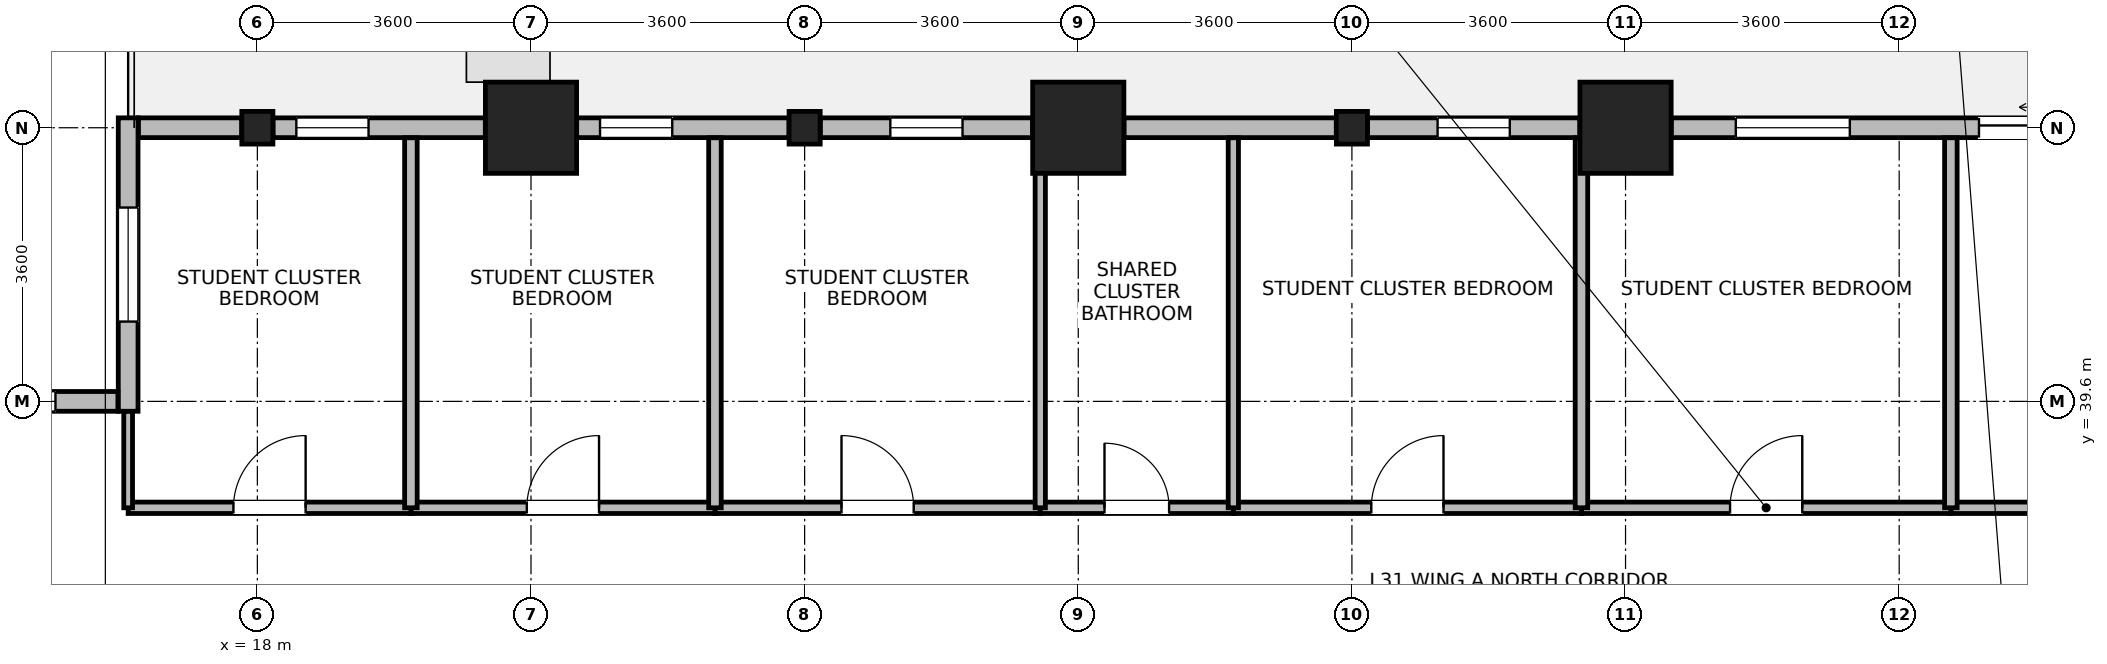
"""IFC4 building model, lengths in metres.
Left out: names, types, materials, properties, quantities, classifications, styles, units other than length and angle.
Written with IfcOpenShell. Run it as: python <this file> out.ifc"""

import sys

from ifc_helpers import new_model, si_unit, direction, frame, frame_2d, origin, origin_2d, place, context, subcontext, project, spatial, rectangle, i_section, extrude, source, transform, mapped, element, fill, save


model = new_model("IFC4")
c1 = context("Model", 3, precision=1e-05, world=origin(), true_north=direction((0.0, 1.0)))
c2 = subcontext(c1, "Body", "Model", "MODEL_VIEW")
j1 = project(units=[si_unit("LENGTHUNIT", "METRE"), si_unit("PLANEANGLEUNIT", "RADIAN")], contexts=[c1])
p1 = place(None, origin())
s1 = spatial("IfcSite", under=j1, at=p1, CompositionType="ELEMENT")
p2 = place(p1, origin())
s2 = spatial("IfcBuilding", under=s1, at=p2, CompositionType="ELEMENT")
p3 = place(p2, frame((0.0, 0.0, 123.0)))
s3 = spatial("IfcBuildingStorey", under=s2, at=p3, CompositionType="ELEMENT", Elevation=123.0)
m1 = source(origin(), c2, "Body", "SweptSolid", [
    extrude(rectangle(XDim=1.2, YDim=1.2, at=origin_2d()), origin(), (0.0, 0.0, 1.0), 3.7),
])
for number, where, z_axis, x_axis in (
    (1, (21.6, 43.2, 0.0), (0.0, 0.0, 1.0), (1.0, 0.0, 0.0)),
    (2, (28.8, 43.2, 0.0), (0.0, 0.0, 1.0), (1.0, 0.0, 0.0)),
    (3, (36.0, 43.2, 0.0), (0.0, 0.0, 1.0), (1.0, 0.0, 0.0)),
):
    element("IfcColumn", number, at=place(p3, frame(where, z_axis=z_axis, x_axis=x_axis)), inside=s3, PredefinedType="COLUMN", context=c2, shape_type="MappedRepresentation", body=[
        mapped(m1, transform((0.0, 0.0, 0.0), x_axis=(1.0, 0.0, 0.0), y_axis=(0.0, 1.0, 0.0), z_axis=(0.0, 0.0, 1.0), scale=1.0)),
    ])
m2 = source(origin(), c2, "Body", "SweptSolid", [
    extrude(i_section(OverallWidth=0.409, OverallDepth=0.43, WebThickness=0.024, FlangeThickness=0.033, FilletRadius=0.015, at=origin_2d()), origin(), (0.0, 0.0, 1.0), 3.7),
])
for number, where, z_axis, x_axis in (
    (4, (18.0, 43.2, 0.0), (0.0, 0.0, 1.0), (1.0, 0.0, 0.0)),
    (5, (25.2, 43.2, 0.0), (0.0, 0.0, 1.0), (1.0, 0.0, 0.0)),
    (6, (32.4, 43.2, 0.0), (0.0, 0.0, 1.0), (1.0, 0.0, 0.0)),
):
    element("IfcColumn", number, at=place(p3, frame(where, z_axis=z_axis, x_axis=x_axis)), inside=s3, PredefinedType="COLUMN", context=c2, shape_type="MappedRepresentation", body=[
        mapped(m2, transform((0.0, 0.0, 0.0), x_axis=(1.0, 0.0, 0.0), y_axis=(0.0, 1.0, 0.0), z_axis=(0.0, 0.0, 1.0), scale=1.0)),
    ])
p4 = place(p3, frame((36.601, 43.2, 0.0), z_axis=(0.0, 0.0, 1.0), x_axis=(1.0, 0.0, 0.0)))
e7 = element("IfcWall", 7, at=p4, inside=s3, PredefinedType="STANDARD", context=c2, shape_type="SweptSolid", body=[
    extrude(rectangle(XDim=9.598, YDim=0.26, at=frame_2d((4.799, 0.0))), origin(), (0.0, 0.0, 1.0), 2.98),
])
p5 = place(p4, frame((4.049, 0.0, 0.0)))
e8 = element("IfcOpeningElement", 8, at=p5, cuts=e7, PredefinedType="OPENING", context=c2, shape_type="SweptSolid", body=[
    extrude(rectangle(XDim=1.5, YDim=2.15, at=frame_2d((0.75, 1.075))), frame((0.0, 0.14, 0.0), z_axis=(0.0, -1.0, 0.0), x_axis=(1.0, 0.0, 0.0)), (0.0, 0.0, 1.0), 0.28),
])
p6 = place(p4, frame((0.85, 0.0, 0.85)))
e9 = element("IfcOpeningElement", 9, at=p6, cuts=e7, PredefinedType="OPENING", context=c2, shape_type="SweptSolid", body=[
    extrude(rectangle(XDim=1.5, YDim=1.85, at=frame_2d((0.75, 0.925))), frame((0.0, 0.14, 0.0), z_axis=(0.0, -1.0, 0.0), x_axis=(1.0, 0.0, 0.0)), (0.0, 0.0, 1.0), 0.28),
])
p7 = place(p4, frame((7.248, 0.0, 0.85)))
e10 = element("IfcOpeningElement", 10, at=p7, cuts=e7, PredefinedType="OPENING", context=c2, shape_type="SweptSolid", body=[
    extrude(rectangle(XDim=1.5, YDim=1.85, at=frame_2d((0.75, 0.925))), frame((0.0, 0.14, 0.0), z_axis=(0.0, -1.0, 0.0), x_axis=(1.0, 0.0, 0.0)), (0.0, 0.0, 1.0), 0.28),
])
p8 = place(p3, frame((32.605, 43.2, 0.0), z_axis=(0.0, 0.0, 1.0), x_axis=(1.0, 0.0, 0.0)))
e11 = element("IfcWall", 11, at=p8, inside=s3, PredefinedType="STANDARD", context=c2, shape_type="SweptSolid", body=[
    extrude(rectangle(XDim=2.793, YDim=0.26, at=frame_2d((1.397, 0.0))), origin(), (0.0, 0.0, 1.0), 2.98),
])
p9 = place(p8, frame((0.922, 0.0, 0.85)))
e12 = element("IfcOpeningElement", 12, at=p9, cuts=e11, PredefinedType="OPENING", context=c2, shape_type="SweptSolid", body=[
    extrude(rectangle(XDim=0.95, YDim=1.75, at=frame_2d((0.475, 0.875))), frame((0.0, 0.14, 0.0), z_axis=(0.0, -1.0, 0.0), x_axis=(1.0, 0.0, 0.0)), (0.0, 0.0, 1.0), 0.28),
])
p10 = place(p3, frame((29.401, 43.2, 0.0), z_axis=(0.0, 0.0, 1.0), x_axis=(1.0, 0.0, 0.0)))
e13 = element("IfcWall", 13, at=p10, inside=s3, PredefinedType="STANDARD", context=c2, shape_type="SweptSolid", body=[
    extrude(rectangle(XDim=2.794, YDim=0.26, at=frame_2d((1.397, 0.0))), origin(), (0.0, 0.0, 1.0), 2.98),
])
p11 = place(p3, frame((25.406, 43.2, 0.0), z_axis=(0.0, 0.0, 1.0), x_axis=(1.0, 0.0, 0.0)))
e14 = element("IfcWall", 14, at=p11, inside=s3, PredefinedType="STANDARD", context=c2, shape_type="SweptSolid", body=[
    extrude(rectangle(XDim=2.793, YDim=0.26, at=frame_2d((1.397, 0.0))), origin(), (0.0, 0.0, 1.0), 2.98),
])
p12 = place(p11, frame((0.922, 0.0, 0.85)))
e15 = element("IfcOpeningElement", 15, at=p12, cuts=e14, PredefinedType="OPENING", context=c2, shape_type="SweptSolid", body=[
    extrude(rectangle(XDim=0.95, YDim=1.75, at=frame_2d((0.475, 0.875))), frame((0.0, 0.14, 0.0), z_axis=(0.0, -1.0, 0.0), x_axis=(1.0, 0.0, 0.0)), (0.0, 0.0, 1.0), 0.28),
])
p13 = place(p3, frame((22.201, 43.2, 0.0), z_axis=(0.0, 0.0, 1.0), x_axis=(1.0, 0.0, 0.0)))
e16 = element("IfcWall", 16, at=p13, inside=s3, PredefinedType="STANDARD", context=c2, shape_type="SweptSolid", body=[
    extrude(rectangle(XDim=2.793, YDim=0.26, at=frame_2d((1.397, 0.0))), origin(), (0.0, 0.0, 1.0), 2.98),
])
p14 = place(p13, frame((0.307, 0.0, 0.85)))
e17 = element("IfcOpeningElement", 17, at=p14, cuts=e16, PredefinedType="OPENING", context=c2, shape_type="SweptSolid", body=[
    extrude(rectangle(XDim=0.95, YDim=1.75, at=frame_2d((0.475, 0.875))), frame((0.0, 0.14, 0.0), z_axis=(0.0, -1.0, 0.0), x_axis=(1.0, 0.0, 0.0)), (0.0, 0.0, 1.0), 0.28),
])
p15 = place(p3, frame((18.206, 43.2, 0.0), z_axis=(0.0, 0.0, 1.0), x_axis=(1.0, 0.0, 0.0)))
e18 = element("IfcWall", 18, at=p15, inside=s3, PredefinedType="STANDARD", context=c2, shape_type="SweptSolid", body=[
    extrude(rectangle(XDim=2.793, YDim=0.26, at=frame_2d((1.397, 0.0))), origin(), (0.0, 0.0, 1.0), 2.98),
])
p16 = place(p15, frame((0.307, 0.0, 0.85)))
e19 = element("IfcOpeningElement", 19, at=p16, cuts=e18, PredefinedType="OPENING", context=c2, shape_type="SweptSolid", body=[
    extrude(rectangle(XDim=0.95, YDim=1.75, at=frame_2d((0.475, 0.875))), frame((0.0, 0.14, 0.0), z_axis=(0.0, -1.0, 0.0), x_axis=(1.0, 0.0, 0.0)), (0.0, 0.0, 1.0), 0.28),
])
p17 = place(p3, frame((16.435, 43.2, 0.0), z_axis=(0.0, 0.0, 1.0), x_axis=(1.0, 0.0, 0.0)))
e20 = element("IfcWall", 20, at=p17, inside=s3, PredefinedType="STANDARD", context=c2, shape_type="SweptSolid", body=[
    extrude(rectangle(XDim=1.359, YDim=0.26, at=frame_2d((0.68, 0.0))), origin(), (0.0, 0.0, 1.0), 2.98),
])
p18 = place(p3, frame((16.3, 39.47, 0.0), z_axis=(0.0, 0.0, 1.0), x_axis=(0.0, 1.0, 0.0)))
e21 = element("IfcWall", 21, at=p18, inside=s3, PredefinedType="STANDARD", context=c2, shape_type="SweptSolid", body=[
    extrude(rectangle(XDim=3.86, YDim=0.26, at=frame_2d((1.93, 0.0))), origin(), (0.0, 0.0, 1.0), 3.43),
])
p19 = place(p18, frame((1.18, 0.0, 0.85)))
e22 = element("IfcOpeningElement", 22, at=p19, cuts=e21, PredefinedType="OPENING", context=c2, shape_type="SweptSolid", body=[
    extrude(rectangle(XDim=1.5, YDim=1.85, at=frame_2d((0.75, 0.925))), frame((0.0, 0.14, 0.0), z_axis=(0.0, -1.0, 0.0), x_axis=(1.0, 0.0, 0.0)), (0.0, 0.0, 1.0), 0.28),
])
p20 = place(p3, frame((6.737, 39.6, 0.0), z_axis=(0.0, 0.0, 1.0), x_axis=(1.0, 0.0, 0.0)))
e23 = element("IfcWall", 23, at=p20, inside=s3, PredefinedType="STANDARD", context=c2, shape_type="SweptSolid", body=[
    extrude(rectangle(XDim=9.428, YDim=0.26, at=frame_2d((4.714, 0.0))), origin(), (0.0, 0.0, 1.0), 3.43),
])
p21 = place(p20, frame((0.821, 0.0, 0.85)))
e24 = element("IfcOpeningElement", 24, at=p21, cuts=e23, PredefinedType="OPENING", context=c2, shape_type="SweptSolid", body=[
    extrude(rectangle(XDim=1.5, YDim=1.85, at=frame_2d((0.75, 0.925))), frame((0.0, 0.14, 0.0), z_axis=(0.0, -1.0, 0.0), x_axis=(1.0, 0.0, 0.0)), (0.0, 0.0, 1.0), 0.28),
])
p22 = place(p20, frame((3.964, 0.0, 0.85)))
e25 = element("IfcOpeningElement", 25, at=p22, cuts=e23, PredefinedType="OPENING", context=c2, shape_type="SweptSolid", body=[
    extrude(rectangle(XDim=1.5, YDim=1.85, at=frame_2d((0.75, 0.925))), frame((0.0, 0.14, 0.0), z_axis=(0.0, -1.0, 0.0), x_axis=(1.0, 0.0, 0.0)), (0.0, 0.0, 1.0), 0.28),
])
p23 = place(p20, frame((7.107, 0.0, 0.85)))
e26 = element("IfcOpeningElement", 26, at=p23, cuts=e23, PredefinedType="OPENING", context=c2, shape_type="SweptSolid", body=[
    extrude(rectangle(XDim=1.5, YDim=1.85, at=frame_2d((0.75, 0.925))), frame((0.0, 0.14, 0.0), z_axis=(0.0, -1.0, 0.0), x_axis=(1.0, 0.0, 0.0)), (0.0, 0.0, 1.0), 0.28),
])
p24 = place(p3, frame((40.28, 38.2, 0.0), z_axis=(0.0, 0.0, 1.0), x_axis=(1.0, 0.0, 0.0)))
e27 = element("IfcWall", 27, at=p24, inside=s3, PredefinedType="PARTITIONING", context=c2, shape_type="SweptSolid", body=[
    extrude(rectangle(XDim=8.96, YDim=0.15, at=frame_2d((4.48, 0.0))), origin(), (0.0, 0.0, 1.0), 3.43),
])
p25 = place(p24, frame((4.03, 0.0, 0.0)))
e28 = element("IfcOpeningElement", 28, at=p25, cuts=e27, PredefinedType="OPENING", context=c2, shape_type="SweptSolid", body=[
    extrude(rectangle(XDim=0.9, YDim=2.08, at=frame_2d((0.45, 1.04))), frame((0.0, 0.085, 0.0), z_axis=(0.0, -1.0, 0.0), x_axis=(1.0, 0.0, 0.0)), (0.0, 0.0, 1.0), 0.17),
])
p26 = place(p3, frame((35.42, 38.2, 0.0), z_axis=(0.0, 0.0, 1.0), x_axis=(1.0, 0.0, 0.0)))
e29 = element("IfcWall", 29, at=p26, inside=s3, PredefinedType="PARTITIONING", context=c2, shape_type="SweptSolid", body=[
    extrude(rectangle(XDim=4.86, YDim=0.15, at=frame_2d((2.43, 0.0))), origin(), (0.0, 0.0, 1.0), 3.43),
])
p27 = place(p26, frame((1.955, 0.0, 0.0)))
e30 = element("IfcOpeningElement", 30, at=p27, cuts=e29, PredefinedType="OPENING", context=c2, shape_type="SweptSolid", body=[
    extrude(rectangle(XDim=0.95, YDim=2.1, at=frame_2d((0.475, 1.05))), frame((0.0, 0.085, 0.0), z_axis=(0.0, -1.0, 0.0), x_axis=(1.0, 0.0, 0.0)), (0.0, 0.0, 1.0), 0.17),
])
p28 = place(p3, frame((30.84, 38.2, 0.0), z_axis=(0.0, 0.0, 1.0), x_axis=(1.0, 0.0, 0.0)))
e31 = element("IfcWall", 31, at=p28, inside=s3, PredefinedType="PARTITIONING", context=c2, shape_type="SweptSolid", body=[
    extrude(rectangle(XDim=4.58, YDim=0.15, at=frame_2d((2.29, 0.0))), origin(), (0.0, 0.0, 1.0), 3.43),
])
p29 = place(p28, frame((1.815, 0.0, 0.0)))
e32 = element("IfcOpeningElement", 32, at=p29, cuts=e31, PredefinedType="OPENING", context=c2, shape_type="SweptSolid", body=[
    extrude(rectangle(XDim=0.95, YDim=2.1, at=frame_2d((0.475, 1.05))), frame((0.0, 0.085, 0.0), z_axis=(0.0, -1.0, 0.0), x_axis=(1.0, 0.0, 0.0)), (0.0, 0.0, 1.0), 0.17),
])
p30 = place(p3, frame((24.02, 38.2, 0.0), z_axis=(0.0, 0.0, 1.0), x_axis=(1.0, 0.0, 0.0)))
e33 = element("IfcWall", 33, at=p30, inside=s3, PredefinedType="PARTITIONING", context=c2, shape_type="SweptSolid", body=[
    extrude(rectangle(XDim=4.28, YDim=0.15, at=frame_2d((2.14, 0.0))), origin(), (0.0, 0.0, 1.0), 3.43),
])
p31 = place(p30, frame((1.665, 0.0, 0.0)))
e34 = element("IfcOpeningElement", 34, at=p31, cuts=e33, PredefinedType="OPENING", context=c2, shape_type="SweptSolid", body=[
    extrude(rectangle(XDim=0.95, YDim=2.1, at=frame_2d((0.475, 1.05))), frame((0.0, 0.085, 0.0), z_axis=(0.0, -1.0, 0.0), x_axis=(1.0, 0.0, 0.0)), (0.0, 0.0, 1.0), 0.17),
])
p32 = place(p3, frame((20.02, 38.2, 0.0), z_axis=(0.0, 0.0, 1.0), x_axis=(1.0, 0.0, 0.0)))
e35 = element("IfcWall", 35, at=p32, inside=s3, PredefinedType="PARTITIONING", context=c2, shape_type="SweptSolid", body=[
    extrude(rectangle(XDim=4.0, YDim=0.15, at=frame_2d((2.0, 0.0))), origin(), (0.0, 0.0, 1.0), 3.43),
])
p33 = place(p32, frame((1.525, 0.0, 0.0)))
e36 = element("IfcOpeningElement", 36, at=p33, cuts=e35, PredefinedType="OPENING", context=c2, shape_type="SweptSolid", body=[
    extrude(rectangle(XDim=0.95, YDim=2.1, at=frame_2d((0.475, 1.05))), frame((0.0, 0.085, 0.0), z_axis=(0.0, -1.0, 0.0), x_axis=(1.0, 0.0, 0.0)), (0.0, 0.0, 1.0), 0.17),
])
p34 = place(p3, frame((16.3, 38.2, 0.0), z_axis=(0.0, 0.0, 1.0), x_axis=(1.0, 0.0, 0.0)))
e37 = element("IfcWall", 37, at=p34, inside=s3, PredefinedType="PARTITIONING", context=c2, shape_type="SweptSolid", body=[
    extrude(rectangle(XDim=3.72, YDim=0.15, at=frame_2d((1.86, 0.0))), origin(), (0.0, 0.0, 1.0), 3.43),
])
p35 = place(p34, frame((1.385, 0.0, 0.0)))
e38 = element("IfcOpeningElement", 38, at=p35, cuts=e37, PredefinedType="OPENING", context=c2, shape_type="SweptSolid", body=[
    extrude(rectangle(XDim=0.95, YDim=2.1, at=frame_2d((0.475, 1.05))), frame((0.0, 0.085, 0.0), z_axis=(0.0, -1.0, 0.0), x_axis=(1.0, 0.0, 0.0)), (0.0, 0.0, 1.0), 0.17),
])
p36 = place(p3, frame((28.3, 38.2, 0.0), z_axis=(0.0, 0.0, 1.0), x_axis=(1.0, 0.0, 0.0)))
e39 = element("IfcWall", 39, at=p36, inside=s3, PredefinedType="PARTITIONING", context=c2, shape_type="SweptSolid", body=[
    extrude(rectangle(XDim=2.54, YDim=0.15, at=frame_2d((1.27, 0.0))), origin(), (0.0, 0.0, 1.0), 3.43),
])
p37 = place(p36, frame((0.845, 0.0, 0.0)))
e40 = element("IfcOpeningElement", 40, at=p37, cuts=e39, PredefinedType="OPENING", context=c2, shape_type="SweptSolid", body=[
    extrude(rectangle(XDim=0.85, YDim=2.04, at=frame_2d((0.425, 1.02))), frame((0.0, 0.085, 0.0), z_axis=(0.0, -1.0, 0.0), x_axis=(1.0, 0.0, 0.0)), (0.0, 0.0, 1.0), 0.17),
])
p38 = place(p3, frame((16.3, 38.2, 0.0), z_axis=(0.0, 0.0, 1.0), x_axis=(0.0, 1.0, 0.0)))
e41 = element("IfcWall", 41, at=p38, inside=s3, PredefinedType="PARTITIONING", context=c2, shape_type="SweptSolid", body=[
    extrude(rectangle(XDim=1.268, YDim=0.115, at=frame_2d((0.634, 0.0))), origin(), (0.0, 0.0, 1.0), 3.43),
])
for number, where, z_axis, x_axis in (
    (42, (20.02, 38.2, 0.0), (0.0, 0.0, 1.0), (0.0, 1.0, 0.0)),
    (43, (24.02, 38.2, 0.0), (0.0, 0.0, 1.0), (0.0, 1.0, 0.0)),
):
    element("IfcWall", number, at=place(p3, frame(where, z_axis=z_axis, x_axis=x_axis)), inside=s3, PredefinedType="PARTITIONING", context=c2, shape_type="SweptSolid", body=[
        extrude(rectangle(XDim=4.868, YDim=0.165, at=frame_2d((2.434, 0.0))), origin(), (0.0, 0.0, 1.0), 3.43),
    ])
for number, where, z_axis, x_axis in (
    (44, (28.3, 38.2, 0.0), (0.0, 0.0, 1.0), (0.0, 1.0, 0.0)),
    (45, (30.84, 38.2, 0.0), (0.0, 0.0, 1.0), (0.0, 1.0, 0.0)),
):
    element("IfcWall", number, at=place(p3, frame(where, z_axis=z_axis, x_axis=x_axis)), inside=s3, PredefinedType="PARTITIONING", context=c2, shape_type="SweptSolid", body=[
        extrude(rectangle(XDim=4.868, YDim=0.135, at=frame_2d((2.434, 0.0))), origin(), (0.0, 0.0, 1.0), 3.43),
    ])
for number, where, z_axis, x_axis in (
    (46, (35.42, 38.2, 0.0), (0.0, 0.0, 1.0), (0.0, 1.0, 0.0)),
    (47, (40.28, 38.2, 0.0), (0.0, 0.0, 1.0), (0.0, 1.0, 0.0)),
):
    element("IfcWall", number, at=place(p3, frame(where, z_axis=z_axis, x_axis=x_axis)), inside=s3, PredefinedType="PARTITIONING", context=c2, shape_type="SweptSolid", body=[
        extrude(rectangle(XDim=4.868, YDim=0.165, at=frame_2d((2.434, 0.0))), origin(), (0.0, 0.0, 1.0), 3.43),
    ])
p39 = place(p5, origin())
e48 = element("IfcDoor", 48, at=p39, inside=s3, OperationType="SLIDING_TO_LEFT", PredefinedType="DOOR", context=c2, shape_type="SweptSolid", body=[
    extrude(rectangle(XDim=1.5, YDim=2.15, at=frame_2d((0.75, 1.075))), frame((0.0, 0.025, 0.0), z_axis=(0.0, -1.0, 0.0), x_axis=(1.0, 0.0, 0.0)), (0.0, 0.0, 1.0), 0.05),
])
fill(e8, e48)
p40 = place(p6, origin())
e49 = element("IfcWindow", 49, at=p40, inside=s3, PartitioningType="SINGLE_PANEL", PredefinedType="WINDOW", context=c2, shape_type="SweptSolid", body=[
    extrude(rectangle(XDim=1.5, YDim=1.85, at=frame_2d((0.75, 0.925))), frame((0.0, 0.03, 0.0), z_axis=(0.0, -1.0, 0.0), x_axis=(1.0, 0.0, 0.0)), (0.0, 0.0, 1.0), 0.06),
])
fill(e9, e49)
p41 = place(p9, origin())
e50 = element("IfcWindow", 50, at=p41, inside=s3, PartitioningType="SINGLE_PANEL", PredefinedType="WINDOW", context=c2, shape_type="SweptSolid", body=[
    extrude(rectangle(XDim=0.95, YDim=1.75, at=frame_2d((0.475, 0.875))), frame((0.0, 0.03, 0.0), z_axis=(0.0, -1.0, 0.0), x_axis=(1.0, 0.0, 0.0)), (0.0, 0.0, 1.0), 0.06),
])
fill(e12, e50)
p42 = place(p12, origin())
e51 = element("IfcWindow", 51, at=p42, inside=s3, PartitioningType="SINGLE_PANEL", PredefinedType="WINDOW", context=c2, shape_type="SweptSolid", body=[
    extrude(rectangle(XDim=0.95, YDim=1.75, at=frame_2d((0.475, 0.875))), frame((0.0, 0.03, 0.0), z_axis=(0.0, -1.0, 0.0), x_axis=(1.0, 0.0, 0.0)), (0.0, 0.0, 1.0), 0.06),
])
fill(e15, e51)
p43 = place(p14, origin())
e52 = element("IfcWindow", 52, at=p43, inside=s3, PartitioningType="SINGLE_PANEL", PredefinedType="WINDOW", context=c2, shape_type="SweptSolid", body=[
    extrude(rectangle(XDim=0.95, YDim=1.75, at=frame_2d((0.475, 0.875))), frame((0.0, 0.03, 0.0), z_axis=(0.0, -1.0, 0.0), x_axis=(1.0, 0.0, 0.0)), (0.0, 0.0, 1.0), 0.06),
])
fill(e17, e52)
p44 = place(p16, origin())
e53 = element("IfcWindow", 53, at=p44, inside=s3, PartitioningType="SINGLE_PANEL", PredefinedType="WINDOW", context=c2, shape_type="SweptSolid", body=[
    extrude(rectangle(XDim=0.95, YDim=1.75, at=frame_2d((0.475, 0.875))), frame((0.0, 0.03, 0.0), z_axis=(0.0, -1.0, 0.0), x_axis=(1.0, 0.0, 0.0)), (0.0, 0.0, 1.0), 0.06),
])
fill(e19, e53)
p45 = place(p19, origin())
e54 = element("IfcWindow", 54, at=p45, inside=s3, PartitioningType="SINGLE_PANEL", PredefinedType="WINDOW", context=c2, shape_type="SweptSolid", body=[
    extrude(rectangle(XDim=1.5, YDim=1.85, at=frame_2d((0.75, 0.925))), frame((0.0, 0.03, 0.0), z_axis=(0.0, -1.0, 0.0), x_axis=(1.0, 0.0, 0.0)), (0.0, 0.0, 1.0), 0.06),
])
fill(e22, e54)
p46 = place(p23, origin())
e55 = element("IfcWindow", 55, at=p46, inside=s3, PartitioningType="SINGLE_PANEL", PredefinedType="WINDOW", context=c2, shape_type="SweptSolid", body=[
    extrude(rectangle(XDim=1.5, YDim=1.85, at=frame_2d((0.75, 0.925))), frame((0.0, 0.03, 0.0), z_axis=(0.0, -1.0, 0.0), x_axis=(1.0, 0.0, 0.0)), (0.0, 0.0, 1.0), 0.06),
])
fill(e26, e55)
p47 = place(p27, origin())
e56 = element("IfcDoor", 56, at=p47, inside=s3, OperationType="SINGLE_SWING_RIGHT", PredefinedType="DOOR", context=c2, shape_type="SweptSolid", body=[
    extrude(rectangle(XDim=0.95, YDim=2.1, at=frame_2d((0.475, 1.05))), frame((0.0, 0.025, 0.0), z_axis=(0.0, -1.0, 0.0), x_axis=(1.0, 0.0, 0.0)), (0.0, 0.0, 1.0), 0.05),
])
fill(e30, e56)
p48 = place(p29, origin())
e57 = element("IfcDoor", 57, at=p48, inside=s3, OperationType="SINGLE_SWING_RIGHT", PredefinedType="DOOR", context=c2, shape_type="SweptSolid", body=[
    extrude(rectangle(XDim=0.95, YDim=2.1, at=frame_2d((0.475, 1.05))), frame((0.0, 0.025, 0.0), z_axis=(0.0, -1.0, 0.0), x_axis=(1.0, 0.0, 0.0)), (0.0, 0.0, 1.0), 0.05),
])
fill(e32, e57)
p49 = place(p31, origin())
e58 = element("IfcDoor", 58, at=p49, inside=s3, OperationType="SINGLE_SWING_LEFT", PredefinedType="DOOR", context=c2, shape_type="SweptSolid", body=[
    extrude(rectangle(XDim=0.95, YDim=2.1, at=frame_2d((0.475, 1.05))), frame((0.0, 0.025, 0.0), z_axis=(0.0, -1.0, 0.0), x_axis=(1.0, 0.0, 0.0)), (0.0, 0.0, 1.0), 0.05),
])
fill(e34, e58)
p50 = place(p33, origin())
e59 = element("IfcDoor", 59, at=p50, inside=s3, OperationType="SINGLE_SWING_RIGHT", PredefinedType="DOOR", context=c2, shape_type="SweptSolid", body=[
    extrude(rectangle(XDim=0.95, YDim=2.1, at=frame_2d((0.475, 1.05))), frame((0.0, 0.025, 0.0), z_axis=(0.0, -1.0, 0.0), x_axis=(1.0, 0.0, 0.0)), (0.0, 0.0, 1.0), 0.05),
])
fill(e36, e59)
p51 = place(p35, origin())
e60 = element("IfcDoor", 60, at=p51, inside=s3, OperationType="SINGLE_SWING_RIGHT", PredefinedType="DOOR", context=c2, shape_type="SweptSolid", body=[
    extrude(rectangle(XDim=0.95, YDim=2.1, at=frame_2d((0.475, 1.05))), frame((0.0, 0.025, 0.0), z_axis=(0.0, -1.0, 0.0), x_axis=(1.0, 0.0, 0.0)), (0.0, 0.0, 1.0), 0.05),
])
fill(e38, e60)
p52 = place(p37, origin())
e61 = element("IfcDoor", 61, at=p52, inside=s3, OperationType="SINGLE_SWING_LEFT", PredefinedType="DOOR", context=c2, shape_type="SweptSolid", body=[
    extrude(rectangle(XDim=0.85, YDim=2.04, at=frame_2d((0.425, 1.02))), frame((0.0, 0.025, 0.0), z_axis=(0.0, -1.0, 0.0), x_axis=(1.0, 0.0, 0.0)), (0.0, 0.0, 1.0), 0.05),
])
fill(e40, e61)
save(model, sys.argv[1])
